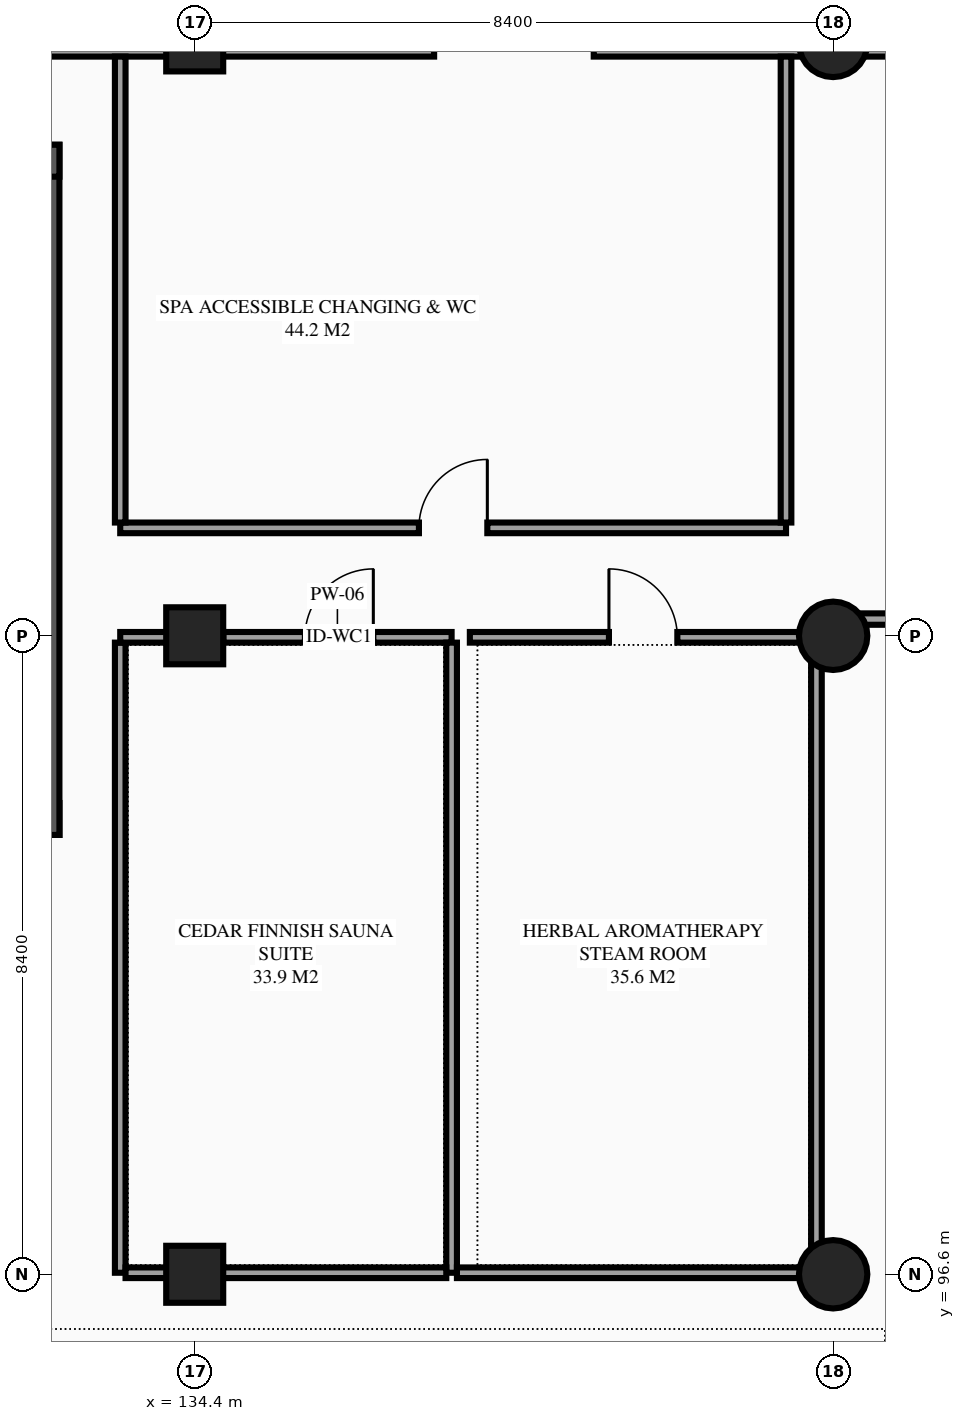
"""IFC4 building model, lengths in metres.
Left out: names, types, materials, properties, quantities, classifications, styles, units other than length and angle.
Written with IfcOpenShell. Run it as: python <this file> out.ifc"""

import sys

from ifc_helpers import new_model, si_unit, direction, frame, frame_2d, origin, origin_2d, place, context, subcontext, project, spatial, rectangle, circle, extrude, element, fill, save


model = new_model("IFC4")
c1 = context("Model", 3, precision=1e-05, world=origin(), true_north=direction((0.0, 1.0)))
c2 = subcontext(c1, "Body", "Model", "MODEL_VIEW")
j1 = project(units=[si_unit("LENGTHUNIT", "METRE"), si_unit("PLANEANGLEUNIT", "RADIAN")], contexts=[c1])
p1 = place(None, origin())
s1 = spatial("IfcSite", under=j1, at=p1, CompositionType="ELEMENT")
p2 = place(p1, origin())
s2 = spatial("IfcBuilding", under=s1, at=p2, CompositionType="ELEMENT")
p3 = place(p2, origin())
s3 = spatial("IfcBuildingStorey", under=s2, at=p3, CompositionType="ELEMENT", Elevation=0.0)
for number, where, z_axis, x_axis in (
    (1, (134.4, 96.6, 0.0), (0.0, 0.0, 1.0), (1.0, 0.0, 0.0)),
    (2, (134.4, 105.0, 0.0), (0.0, 0.0, 1.0), (1.0, 0.0, 0.0)),
    (3, (134.4, 112.8, 0.0), (0.0, 0.0, 1.0), (1.0, 0.0, 0.0)),
):
    element("IfcColumn", number, at=place(p3, frame(where, z_axis=z_axis, x_axis=x_axis)), inside=s3, PredefinedType="COLUMN", context=c2, shape_type="SweptSolid", body=[
        extrude(rectangle(XDim=0.75, YDim=0.75, at=origin_2d()), origin(), (0.0, 0.0, 1.0), 5.4),
    ])
for number, where, z_axis, x_axis in (
    (4, (142.8, 96.6, 0.0), (0.0, 0.0, 1.0), (1.0, 0.0, 0.0)),
    (5, (142.8, 105.0, 0.0), (0.0, 0.0, 1.0), (1.0, 0.0, 0.0)),
    (6, (142.8, 112.8, 0.0), (0.0, 0.0, 1.0), (1.0, 0.0, 0.0)),
):
    element("IfcColumn", number, at=place(p3, frame(where, z_axis=z_axis, x_axis=x_axis)), inside=s3, PredefinedType="COLUMN", context=c2, shape_type="SweptSolid", body=[
        extrude(circle(Radius=0.45, at=origin_2d()), origin(), (0.0, 0.0, 1.0), 5.4),
    ])
p4 = place(p3, frame((151.2, 112.8, 0.0), z_axis=(0.0, 0.0, 1.0), x_axis=(-1.0, 0.0, 0.0)))
e7 = element("IfcWall", 7, at=p4, inside=s3, PredefinedType="STANDARD", context=c2, shape_type="SweptSolid", body=[
    extrude(rectangle(XDim=8.4, YDim=0.36, at=frame_2d((4.2, 0.0))), origin(), (0.0, 0.0, 1.0), 4.29),
])
p5 = place(p4, frame((5.25, 0.0, 0.0), z_axis=(0.0, 0.0, 1.0), x_axis=(-1.0, 0.0, 0.0)))
e8 = element("IfcOpeningElement", 8, at=p5, cuts=e7, PredefinedType="OPENING", context=c2, shape_type="SweptSolid", body=[
    extrude(rectangle(XDim=2.1, YDim=2.4, at=frame_2d((1.05, 1.2))), frame((0.0, 0.19, 0.0), z_axis=(0.0, -1.0, 0.0), x_axis=(1.0, 0.0, 0.0)), (0.0, 0.0, 1.0), 0.38),
])
p6 = place(p3, frame((142.8, 112.8, 0.0), z_axis=(0.0, 0.0, 1.0), x_axis=(-1.0, 0.0, 0.0)))
e9 = element("IfcWall", 9, at=p6, inside=s3, PredefinedType="STANDARD", context=c2, shape_type="SweptSolid", body=[
    extrude(rectangle(XDim=8.4, YDim=0.36, at=frame_2d((4.2, 0.0))), origin(), (0.0, 0.0, 1.0), 4.786),
])
p7 = place(p6, frame((5.25, 0.0, 0.0), z_axis=(0.0, 0.0, 1.0), x_axis=(-1.0, 0.0, 0.0)))
e10 = element("IfcOpeningElement", 10, at=p7, cuts=e9, PredefinedType="OPENING", context=c2, shape_type="SweptSolid", body=[
    extrude(rectangle(XDim=2.1, YDim=2.4, at=frame_2d((1.05, 1.2))), frame((0.0, 0.19, 0.0), z_axis=(0.0, -1.0, 0.0), x_axis=(1.0, 0.0, 0.0)), (0.0, 0.0, 1.0), 0.38),
])
p8 = place(p3, frame((134.4, 112.8, 0.0), z_axis=(0.0, 0.0, 1.0), x_axis=(-1.0, 0.0, 0.0)))
e11 = element("IfcWall", 11, at=p8, inside=s3, PredefinedType="STANDARD", context=c2, shape_type="SweptSolid", body=[
    extrude(rectangle(XDim=8.4, YDim=0.36, at=frame_2d((4.2, 0.0))), origin(), (0.0, 0.0, 1.0), 4.893),
])
p9 = place(p8, frame((3.6, 0.0, 0.8)))
e12 = element("IfcOpeningElement", 12, at=p9, cuts=e11, PredefinedType="OPENING", context=c2, shape_type="SweptSolid", body=[
    extrude(rectangle(XDim=1.2, YDim=1.5, at=frame_2d((0.6, 0.75))), frame((0.0, 0.19, 0.0), z_axis=(0.0, -1.0, 0.0), x_axis=(1.0, 0.0, 0.0)), (0.0, 0.0, 1.0), 0.38),
])
p10 = place(p3, frame((127.18, 102.59, 0.0), z_axis=(0.0, 0.0, 1.0), x_axis=(1.0, 0.0, 0.0)))
e13 = element("IfcWall", 13, at=p10, inside=s3, PredefinedType="SHEAR", context=c2, shape_type="SweptSolid", body=[
    extrude(rectangle(XDim=5.44, YDim=0.42, at=frame_2d((2.72, 0.0))), origin(), (0.0, 0.0, 1.0), 5.4),
])
p11 = place(p10, frame((3.295, 0.0, 0.0), z_axis=(0.0, 0.0, 1.0), x_axis=(-1.0, 0.0, 0.0)))
e14 = element("IfcOpeningElement", 14, at=p11, cuts=e13, PredefinedType="OPENING", context=c2, shape_type="SweptSolid", body=[
    extrude(rectangle(XDim=1.15, YDim=2.15, at=frame_2d((0.575, 1.075))), frame((0.0, 0.22, 0.0), z_axis=(0.0, -1.0, 0.0), x_axis=(1.0, 0.0, 0.0)), (0.0, 0.0, 1.0), 0.44),
])
p12 = place(p3, frame((132.41, 102.38, 0.0), z_axis=(0.0, 0.0, 1.0), x_axis=(0.0, 1.0, 0.0)))
e15 = element("IfcWall", 15, at=p12, inside=s3, PredefinedType="SHEAR", context=c2, shape_type="SweptSolid", body=[
    extrude(rectangle(XDim=9.08, YDim=0.42, at=frame_2d((4.54, 0.0))), origin(), (0.0, 0.0, 1.0), 5.4),
])
p13 = place(p3, frame((132.62, 111.25, 0.0), z_axis=(0.0, 0.0, 1.0), x_axis=(-1.0, 0.0, 0.0)))
e16 = element("IfcWall", 16, at=p13, inside=s3, PredefinedType="SHEAR", context=c2, shape_type="SweptSolid", body=[
    extrude(rectangle(XDim=5.44, YDim=0.42, at=frame_2d((2.72, 0.0))), origin(), (0.0, 0.0, 1.0), 5.4),
])
p14 = place(p3, frame((134.775, 104.98, 0.0), z_axis=(0.0, 0.0, 1.0), x_axis=(1.0, 0.0, 0.0)))
e17 = element("IfcWall", 17, at=p14, inside=s3, PredefinedType="PARTITIONING", context=c2, shape_type="SweptSolid", body=[
    extrude(rectangle(XDim=3.005, YDim=0.14, at=frame_2d((1.502, 0.0))), origin(), (0.0, 0.0, 1.0), 4.64),
])
p15 = place(p14, frame((1.075, 0.0, 0.0)))
e18 = element("IfcOpeningElement", 18, at=p15, cuts=e17, PredefinedType="OPENING", context=c2, shape_type="SweptSolid", body=[
    extrude(rectangle(XDim=0.9, YDim=2.12, at=frame_2d((0.45, 1.06))), frame((0.0, 0.08, 0.0), z_axis=(0.0, -1.0, 0.0), x_axis=(1.0, 0.0, 0.0)), (0.0, 0.0, 1.0), 0.16),
])
for number, where, z_axis, x_axis in (
    (19, (133.42, 96.62, 0.0), (0.0, 0.0, 1.0), (0.0, 1.0, 0.0)),
    (20, (137.78, 96.62, 0.0), (0.0, 0.0, 1.0), (0.0, 1.0, 0.0)),
):
    element("IfcWall", number, at=place(p3, frame(where, z_axis=z_axis, x_axis=x_axis)), inside=s3, PredefinedType="PARTITIONING", context=c2, shape_type="SweptSolid", body=[
        extrude(rectangle(XDim=8.29, YDim=0.14, at=frame_2d((4.145, 0.0))), origin(), (0.0, 0.0, 1.0), 5.135),
    ])
p16 = place(p3, frame((134.4, 96.62, 0.0), z_axis=(0.0, 0.0, 1.0), x_axis=(1.0, 0.0, 0.0)))
e21 = element("IfcWall", 21, at=p16, inside=s3, PredefinedType="PARTITIONING", context=c2, shape_type="SweptSolid", body=[
    extrude(rectangle(XDim=3.31, YDim=0.14, at=frame_2d((1.655, 0.0))), origin(), (0.0, 0.0, 1.0), 4.29),
])
p17 = place(p3, frame((138.02, 104.98, 0.0), z_axis=(0.0, 0.0, 1.0), x_axis=(1.0, 0.0, 0.0)))
e22 = element("IfcWall", 22, at=p17, inside=s3, PredefinedType="PARTITIONING", context=c2, shape_type="SweptSolid", body=[
    extrude(rectangle(XDim=4.56, YDim=0.14, at=frame_2d((2.28, 0.0))), origin(), (0.0, 0.0, 1.0), 4.64),
])
p18 = place(p17, frame((1.83, 0.0, 0.0)))
e23 = element("IfcOpeningElement", 23, at=p18, cuts=e22, PredefinedType="OPENING", context=c2, shape_type="SweptSolid", body=[
    extrude(rectangle(XDim=0.9, YDim=2.12, at=frame_2d((0.45, 1.06))), frame((0.0, 0.08, 0.0), z_axis=(0.0, -1.0, 0.0), x_axis=(1.0, 0.0, 0.0)), (0.0, 0.0, 1.0), 0.16),
])
p19 = place(p3, frame((142.58, 96.62, 0.0), z_axis=(0.0, 0.0, 1.0), x_axis=(0.0, 1.0, 0.0)))
e24 = element("IfcWall", 24, at=p19, inside=s3, PredefinedType="PARTITIONING", context=c2, shape_type="SweptSolid", body=[
    extrude(rectangle(XDim=8.29, YDim=0.14, at=frame_2d((4.145, 0.0))), origin(), (0.0, 0.0, 1.0), 5.135),
])
p20 = place(p3, frame((137.85, 96.62, 0.0), z_axis=(0.0, 0.0, 1.0), x_axis=(1.0, 0.0, 0.0)))
e25 = element("IfcWall", 25, at=p20, inside=s3, PredefinedType="PARTITIONING", context=c2, shape_type="SweptSolid", body=[
    extrude(rectangle(XDim=4.66, YDim=0.14, at=frame_2d((2.33, 0.0))), origin(), (0.0, 0.0, 1.0), 4.29),
])
p21 = place(p3, frame((133.42, 106.42, 0.0), z_axis=(0.0, 0.0, 1.0), x_axis=(1.0, 0.0, 0.0)))
e26 = element("IfcWall", 26, at=p21, inside=s3, PredefinedType="PARTITIONING", context=c2, shape_type="SweptSolid", body=[
    extrude(rectangle(XDim=8.76, YDim=0.14, at=frame_2d((4.38, 0.0))), origin(), (0.0, 0.0, 1.0), 5.135),
])
p22 = place(p21, frame((3.93, 0.0, 0.0)))
e27 = element("IfcOpeningElement", 27, at=p22, cuts=e26, PredefinedType="OPENING", context=c2, shape_type="SweptSolid", body=[
    extrude(rectangle(XDim=0.9, YDim=2.12, at=frame_2d((0.45, 1.06))), frame((0.0, 0.08, 0.0), z_axis=(0.0, -1.0, 0.0), x_axis=(1.0, 0.0, 0.0)), (0.0, 0.0, 1.0), 0.16),
])
for number, where, z_axis, x_axis in (
    (28, (133.42, 106.49, 0.0), (0.0, 0.0, 1.0), (0.0, 1.0, 0.0)),
    (29, (142.18, 106.49, 0.0), (0.0, 0.0, 1.0), (0.0, 1.0, 0.0)),
):
    element("IfcWall", number, at=place(p3, frame(where, z_axis=z_axis, x_axis=x_axis)), inside=s3, PredefinedType="PARTITIONING", context=c2, shape_type="SweptSolid", body=[
        extrude(rectangle(XDim=6.13, YDim=0.14, at=frame_2d((3.065, 0.0))), origin(), (0.0, 0.0, 1.0), 5.135),
    ])
p23 = place(p3, frame((133.42, 104.98, 0.0), z_axis=(0.0, 0.0, 1.0), x_axis=(1.0, 0.0, 0.0)))
e30 = element("IfcWall", 30, at=p23, inside=s3, PredefinedType="PARTITIONING", context=c2, shape_type="SweptSolid", body=[
    extrude(rectangle(XDim=1.355, YDim=0.14, at=frame_2d((0.677, 0.0))), origin(), (0.0, 0.0, 1.0), 5.135),
])
p24 = place(p3, frame((133.49, 96.62, 0.0), z_axis=(0.0, 0.0, 1.0), x_axis=(1.0, 0.0, 0.0)))
e31 = element("IfcWall", 31, at=p24, inside=s3, PredefinedType="PARTITIONING", context=c2, shape_type="SweptSolid", body=[
    extrude(rectangle(XDim=0.91, YDim=0.14, at=frame_2d((0.455, 0.0))), origin(), (0.0, 0.0, 1.0), 4.456),
])
p25 = place(p3, frame((143.02, 105.22, 0.0), z_axis=(0.0, 0.0, 1.0), x_axis=(1.0, 0.0, 0.0)))
e32 = element("IfcWall", 32, at=p25, inside=s3, PredefinedType="PARTITIONING", context=c2, shape_type="SweptSolid", body=[
    extrude(rectangle(XDim=8.555, YDim=0.15, at=frame_2d((4.277, 0.0))), origin(), (0.0, 0.0, 1.0), 5.135),
])
p26 = place(p15, origin())
e33 = element("IfcDoor", 33, at=p26, inside=s3, OperationType="SINGLE_SWING_RIGHT", PredefinedType="DOOR", context=c2, shape_type="SweptSolid", body=[
    extrude(rectangle(XDim=0.9, YDim=2.12, at=frame_2d((0.45, 1.06))), frame((0.0, 0.025, 0.0), z_axis=(0.0, -1.0, 0.0), x_axis=(1.0, 0.0, 0.0)), (0.0, 0.0, 1.0), 0.05),
])
fill(e18, e33)
p27 = place(p18, origin())
e34 = element("IfcDoor", 34, at=p27, inside=s3, OperationType="SINGLE_SWING_LEFT", PredefinedType="DOOR", context=c2, shape_type="SweptSolid", body=[
    extrude(rectangle(XDim=0.9, YDim=2.12, at=frame_2d((0.45, 1.06))), frame((0.0, 0.025, 0.0), z_axis=(0.0, -1.0, 0.0), x_axis=(1.0, 0.0, 0.0)), (0.0, 0.0, 1.0), 0.05),
])
fill(e23, e34)
p28 = place(p22, origin())
e35 = element("IfcDoor", 35, at=p28, inside=s3, OperationType="SINGLE_SWING_RIGHT", PredefinedType="DOOR", context=c2, shape_type="SweptSolid", body=[
    extrude(rectangle(XDim=0.9, YDim=2.12, at=frame_2d((0.45, 1.06))), frame((0.0, 0.025, 0.0), z_axis=(0.0, -1.0, 0.0), x_axis=(1.0, 0.0, 0.0)), (0.0, 0.0, 1.0), 0.05),
])
fill(e27, e35)
save(model, sys.argv[1])
